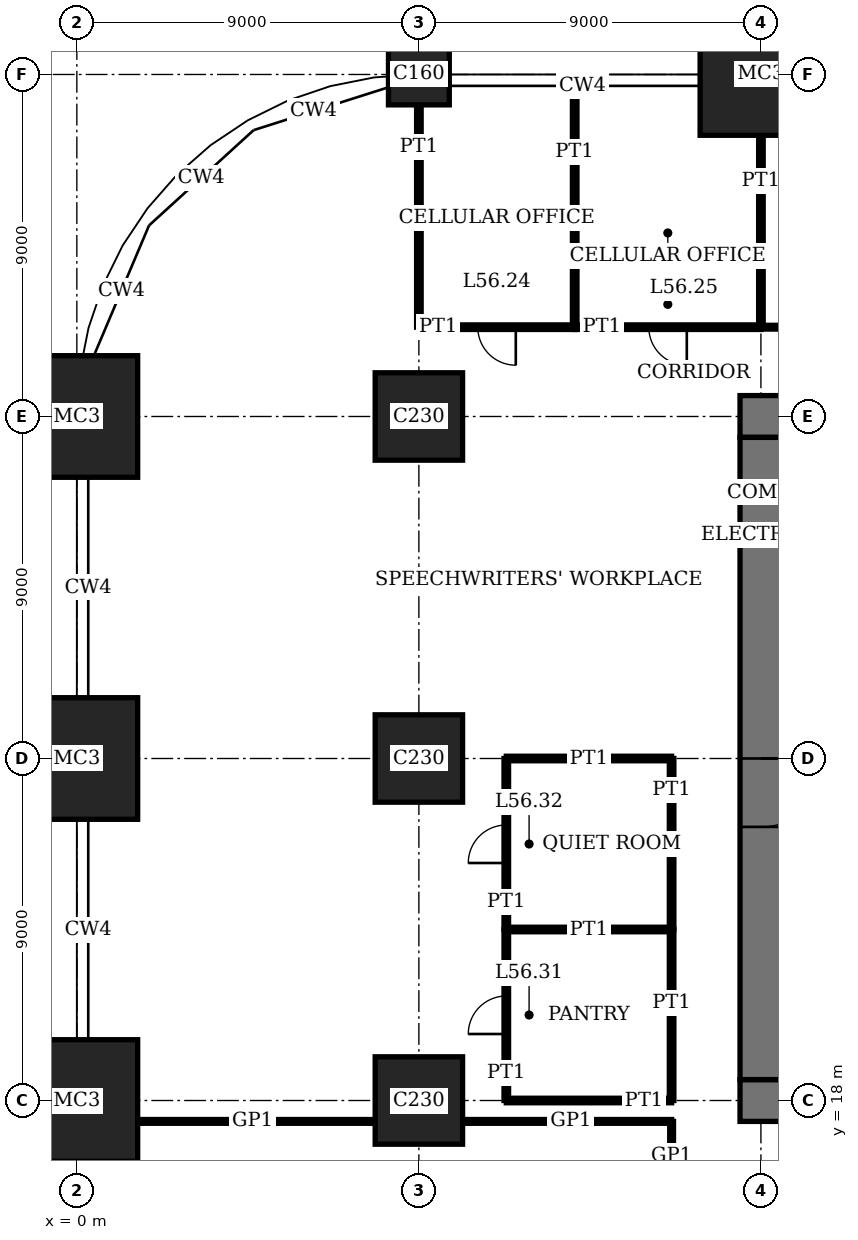
"""IFC4 building model, lengths in metres.
Left out: names, types, materials, properties, quantities, classifications, styles, units other than length and angle.
Written with IfcOpenShell. Run it as: python <this file> out.ifc"""

import sys

from ifc_helpers import new_model, si_unit, direction, frame, frame_2d, origin, origin_2d, place, context, subcontext, project, spatial, rectangle, extrude, element, fill, save


model = new_model("IFC4")
c1 = context("Model", 3, precision=1e-05, world=origin(), true_north=direction((0.0, 1.0)))
c2 = subcontext(c1, "Body", "Model", "MODEL_VIEW")
j1 = project(units=[si_unit("LENGTHUNIT", "METRE"), si_unit("PLANEANGLEUNIT", "RADIAN")], contexts=[c1])
p1 = place(None, origin())
s1 = spatial("IfcSite", under=j1, at=p1, CompositionType="ELEMENT")
p2 = place(p1, origin())
s2 = spatial("IfcBuilding", under=s1, at=p2, CompositionType="ELEMENT")
p3 = place(p2, frame((0.0, 0.0, 230.2)))
s3 = spatial("IfcBuildingStorey", under=s2, at=p3, CompositionType="ELEMENT", Elevation=230.2)
for number, where, z_axis, x_axis in (
    (1, (0.0, 18.0, 0.0), (0.0, 0.0, 1.0), (1.0, 0.0, 0.0)),
    (2, (0.0, 27.0, 0.0), (0.0, 0.0, 1.0), (1.0, 0.0, 0.0)),
    (3, (0.0, 36.0, 0.0), (0.0, 0.0, 1.0), (1.0, 0.0, 0.0)),
):
    element("IfcColumn", number, at=place(p3, frame(where, z_axis=z_axis, x_axis=x_axis)), inside=s3, PredefinedType="COLUMN", context=c2, shape_type="SweptSolid", body=[
        extrude(rectangle(XDim=3.2, YDim=3.2, at=origin_2d()), origin(), (0.0, 0.0, 1.0), 4.2),
    ])
for number, where, z_axis, x_axis in (
    (4, (9.0, 18.0, 0.0), (0.0, 0.0, 1.0), (1.0, 0.0, 0.0)),
    (5, (9.0, 27.0, 0.0), (0.0, 0.0, 1.0), (1.0, 0.0, 0.0)),
    (6, (9.0, 36.0, 0.0), (0.0, 0.0, 1.0), (1.0, 0.0, 0.0)),
):
    element("IfcColumn", number, at=place(p3, frame(where, z_axis=z_axis, x_axis=x_axis)), inside=s3, PredefinedType="COLUMN", context=c2, shape_type="SweptSolid", body=[
        extrude(rectangle(XDim=2.3, YDim=2.3, at=origin_2d()), origin(), (0.0, 0.0, 1.0), 4.2),
    ])
p4 = place(p3, frame((9.0, 45.0, 0.0), z_axis=(0.0, 0.0, 1.0), x_axis=(1.0, 0.0, 0.0)))
e7 = element("IfcColumn", 7, at=p4, inside=s3, PredefinedType="COLUMN", context=c2, shape_type="SweptSolid", body=[
    extrude(rectangle(XDim=1.6, YDim=1.6, at=origin_2d()), origin(), (0.0, 0.0, 1.0), 4.2),
])
p5 = place(p3, frame((18.0, 45.0, 0.0), z_axis=(0.0, 0.0, 1.0), x_axis=(1.0, 0.0, 0.0)))
e8 = element("IfcColumn", 8, at=p5, inside=s3, PredefinedType="COLUMN", context=c2, shape_type="SweptSolid", body=[
    extrude(rectangle(XDim=3.2, YDim=3.2, at=origin_2d()), origin(), (0.0, 0.0, 1.0), 4.2),
])
p6 = place(p3, frame((17.45, 18.0, 0.0), z_axis=(0.0, 0.0, 1.0), x_axis=(1.0, 0.0, 0.0)))
e9 = element("IfcWall", 9, at=p6, inside=s3, PredefinedType="SHEAR", context=c2, shape_type="SweptSolid", body=[
    extrude(rectangle(XDim=28.1, YDim=1.1, at=frame_2d((14.05, 0.0))), origin(), (0.0, 0.0, 1.0), 4.2),
])
p7 = place(p6, frame((11.55, 0.0, 0.0)))
e10 = element("IfcOpeningElement", 10, at=p7, cuts=e9, PredefinedType="OPENING", context=c2, shape_type="SweptSolid", body=[
    extrude(rectangle(XDim=1.0, YDim=2.4, at=frame_2d((0.5, 1.2))), frame((0.0, 0.56, 0.0), z_axis=(0.0, -1.0, 0.0), x_axis=(1.0, 0.0, 0.0)), (0.0, 0.0, 1.0), 1.12),
])
p8 = place(p6, frame((16.55, 0.0, 0.0)))
e11 = element("IfcOpeningElement", 11, at=p8, cuts=e9, PredefinedType="OPENING", context=c2, shape_type="SweptSolid", body=[
    extrude(rectangle(XDim=1.0, YDim=2.4, at=frame_2d((0.5, 1.2))), frame((0.0, 0.56, 0.0), z_axis=(0.0, -1.0, 0.0), x_axis=(1.0, 0.0, 0.0)), (0.0, 0.0, 1.0), 1.12),
])
p9 = place(p6, frame((20.0, 0.0, 0.0)))
e12 = element("IfcOpeningElement", 12, at=p9, cuts=e9, PredefinedType="OPENING", context=c2, shape_type="SweptSolid", body=[
    extrude(rectangle(XDim=1.1, YDim=2.4, at=frame_2d((0.55, 1.2))), frame((0.0, 0.56, 0.0), z_axis=(0.0, -1.0, 0.0), x_axis=(1.0, 0.0, 0.0)), (0.0, 0.0, 1.0), 1.12),
])
p10 = place(p6, frame((24.05, 0.0, 0.0)))
e13 = element("IfcOpeningElement", 13, at=p10, cuts=e9, PredefinedType="OPENING", context=c2, shape_type="SweptSolid", body=[
    extrude(rectangle(XDim=1.0, YDim=2.4, at=frame_2d((0.5, 1.2))), frame((0.0, 0.56, 0.0), z_axis=(0.0, -1.0, 0.0), x_axis=(1.0, 0.0, 0.0)), (0.0, 0.0, 1.0), 1.12),
])
p11 = place(p3, frame((45.55, 36.0, 0.0), z_axis=(0.0, 0.0, 1.0), x_axis=(-1.0, 0.0, 0.0)))
e14 = element("IfcWall", 14, at=p11, inside=s3, PredefinedType="SHEAR", context=c2, shape_type="SweptSolid", body=[
    extrude(rectangle(XDim=28.1, YDim=1.1, at=frame_2d((14.05, 0.0))), origin(), (0.0, 0.0, 1.0), 4.2),
])
p12 = place(p11, frame((11.55, 0.0, 0.0)))
e15 = element("IfcOpeningElement", 15, at=p12, cuts=e14, PredefinedType="OPENING", context=c2, shape_type="SweptSolid", body=[
    extrude(rectangle(XDim=1.0, YDim=2.4, at=frame_2d((0.5, 1.2))), frame((0.0, 0.56, 0.0), z_axis=(0.0, -1.0, 0.0), x_axis=(1.0, 0.0, 0.0)), (0.0, 0.0, 1.0), 1.12),
])
p13 = place(p11, frame((16.55, 0.0, 0.0)))
e16 = element("IfcOpeningElement", 16, at=p13, cuts=e14, PredefinedType="OPENING", context=c2, shape_type="SweptSolid", body=[
    extrude(rectangle(XDim=1.0, YDim=2.4, at=frame_2d((0.5, 1.2))), frame((0.0, 0.56, 0.0), z_axis=(0.0, -1.0, 0.0), x_axis=(1.0, 0.0, 0.0)), (0.0, 0.0, 1.0), 1.12),
])
p14 = place(p11, frame((20.0, 0.0, 0.0)))
e17 = element("IfcOpeningElement", 17, at=p14, cuts=e14, PredefinedType="OPENING", context=c2, shape_type="SweptSolid", body=[
    extrude(rectangle(XDim=1.1, YDim=2.4, at=frame_2d((0.55, 1.2))), frame((0.0, 0.56, 0.0), z_axis=(0.0, -1.0, 0.0), x_axis=(1.0, 0.0, 0.0)), (0.0, 0.0, 1.0), 1.12),
])
p15 = place(p11, frame((24.05, 0.0, 0.0)))
e18 = element("IfcOpeningElement", 18, at=p15, cuts=e14, PredefinedType="OPENING", context=c2, shape_type="SweptSolid", body=[
    extrude(rectangle(XDim=1.0, YDim=2.4, at=frame_2d((0.5, 1.2))), frame((0.0, 0.56, 0.0), z_axis=(0.0, -1.0, 0.0), x_axis=(1.0, 0.0, 0.0)), (0.0, 0.0, 1.0), 1.12),
])
p16 = place(p3, frame((18.0, 35.45, 0.0), z_axis=(0.0, 0.0, 1.0), x_axis=(0.0, -1.0, 0.0)))
e19 = element("IfcWall", 19, at=p16, inside=s3, PredefinedType="SHEAR", context=c2, shape_type="SweptSolid", body=[
    extrude(rectangle(XDim=16.9, YDim=1.1, at=frame_2d((8.45, 0.0))), origin(), (0.0, 0.0, 1.0), 4.2),
])
p17 = place(p16, frame((8.45, 0.0, 0.0)))
e20 = element("IfcOpeningElement", 20, at=p17, cuts=e19, PredefinedType="OPENING", context=c2, shape_type="SweptSolid", body=[
    extrude(rectangle(XDim=1.8, YDim=2.4, at=frame_2d((0.9, 1.2))), frame((0.0, 0.56, 0.0), z_axis=(0.0, -1.0, 0.0), x_axis=(1.0, 0.0, 0.0)), (0.0, 0.0, 1.0), 1.12),
])
p18 = place(p3, frame((1.6, 17.45, 0.0), z_axis=(0.0, 0.0, 1.0), x_axis=(1.0, 0.0, 0.0)))
e21 = element("IfcWall", 21, at=p18, inside=s3, PredefinedType="PARTITIONING", context=c2, shape_type="SweptSolid", body=[
    extrude(rectangle(XDim=6.25, YDim=0.1, at=frame_2d((3.125, 0.0))), origin(), (0.0, 0.0, 1.0), 3.85),
])
p19 = place(p3, frame((10.15, 17.45, 0.0), z_axis=(0.0, 0.0, 1.0), x_axis=(1.0, 0.0, 0.0)))
e22 = element("IfcWall", 22, at=p19, inside=s3, PredefinedType="PARTITIONING", context=c2, shape_type="SweptSolid", body=[
    extrude(rectangle(XDim=5.5, YDim=0.1, at=frame_2d((2.75, 0.0))), origin(), (0.0, 0.0, 1.0), 3.85),
])
p20 = place(p3, frame((11.3, 18.0, 0.0), z_axis=(0.0, 0.0, 1.0), x_axis=(1.0, 0.0, 0.0)))
e23 = element("IfcWall", 23, at=p20, inside=s3, PredefinedType="PARTITIONING", context=c2, shape_type="SweptSolid", body=[
    extrude(rectangle(XDim=4.35, YDim=0.12, at=frame_2d((2.175, 0.0))), origin(), (0.0, 0.0, 1.0), 3.25),
])
p21 = place(p3, frame((11.3, 22.5, 0.0), z_axis=(0.0, 0.0, 1.0), x_axis=(1.0, 0.0, 0.0)))
e24 = element("IfcWall", 24, at=p21, inside=s3, PredefinedType="PARTITIONING", context=c2, shape_type="SweptSolid", body=[
    extrude(rectangle(XDim=4.35, YDim=0.12, at=frame_2d((2.175, 0.0))), origin(), (0.0, 0.0, 1.0), 3.15),
])
p22 = place(p3, frame((11.3, 27.0, 0.0), z_axis=(0.0, 0.0, 1.0), x_axis=(1.0, 0.0, 0.0)))
e25 = element("IfcWall", 25, at=p22, inside=s3, PredefinedType="PARTITIONING", context=c2, shape_type="SweptSolid", body=[
    extrude(rectangle(XDim=4.35, YDim=0.12, at=frame_2d((2.175, 0.0))), origin(), (0.0, 0.0, 1.0), 3.25),
])
p23 = place(p3, frame((9.0, 38.35, 0.0), z_axis=(0.0, 0.0, 1.0), x_axis=(1.0, 0.0, 0.0)))
e26 = element("IfcWall", 26, at=p23, inside=s3, PredefinedType="PARTITIONING", context=c2, shape_type="SweptSolid", body=[
    extrude(rectangle(XDim=4.1, YDim=0.12, at=frame_2d((2.05, 0.0))), origin(), (0.0, 0.0, 1.0), 3.85),
])
p24 = place(p23, frame((1.55, 0.0, 0.0)))
e27 = element("IfcOpeningElement", 27, at=p24, cuts=e26, PredefinedType="OPENING", context=c2, shape_type="SweptSolid", body=[
    extrude(rectangle(XDim=1.0, YDim=2.4, at=frame_2d((0.5, 1.2))), frame((0.0, 0.07, 0.0), z_axis=(0.0, -1.0, 0.0), x_axis=(1.0, 0.0, 0.0)), (0.0, 0.0, 1.0), 0.14),
])
p25 = place(p3, frame((13.1, 38.35, 0.0), z_axis=(0.0, 0.0, 1.0), x_axis=(1.0, 0.0, 0.0)))
e28 = element("IfcWall", 28, at=p25, inside=s3, PredefinedType="PARTITIONING", context=c2, shape_type="SweptSolid", body=[
    extrude(rectangle(XDim=4.9, YDim=0.12, at=frame_2d((2.45, 0.0))), origin(), (0.0, 0.0, 1.0), 3.85),
])
p26 = place(p25, frame((1.95, 0.0, 0.0)))
e29 = element("IfcOpeningElement", 29, at=p26, cuts=e28, PredefinedType="OPENING", context=c2, shape_type="SweptSolid", body=[
    extrude(rectangle(XDim=1.0, YDim=2.4, at=frame_2d((0.5, 1.2))), frame((0.0, 0.07, 0.0), z_axis=(0.0, -1.0, 0.0), x_axis=(1.0, 0.0, 0.0)), (0.0, 0.0, 1.0), 0.14),
])
p27 = place(p3, frame((18.0, 38.35, 0.0), z_axis=(0.0, 0.0, 1.0), x_axis=(1.0, 0.0, 0.0)))
e30 = element("IfcWall", 30, at=p27, inside=s3, PredefinedType="PARTITIONING", context=c2, shape_type="SweptSolid", body=[
    extrude(rectangle(XDim=9.0, YDim=0.1, at=frame_2d((4.5, 0.0))), origin(), (0.0, 0.0, 1.0), 3.85),
])
p28 = place(p27, frame((4.0, 0.0, 0.0)))
e31 = element("IfcOpeningElement", 31, at=p28, cuts=e30, PredefinedType="OPENING", context=c2, shape_type="SweptSolid", body=[
    extrude(rectangle(XDim=1.0, YDim=2.4, at=frame_2d((0.5, 1.2))), frame((0.0, 0.06, 0.0), z_axis=(0.0, -1.0, 0.0), x_axis=(1.0, 0.0, 0.0)), (0.0, 0.0, 1.0), 0.12),
])
p29 = place(p3, frame((9.0, 38.35, 0.0), z_axis=(0.0, 0.0, 1.0), x_axis=(0.0, 1.0, 0.0)))
e32 = element("IfcWall", 32, at=p29, inside=s3, PredefinedType="PARTITIONING", context=c2, shape_type="SweptSolid", body=[
    extrude(rectangle(XDim=5.85, YDim=0.12, at=frame_2d((2.925, 0.0))), origin(), (0.0, 0.0, 1.0), 3.05),
])
p30 = place(p3, frame((11.3, 18.0, 0.0), z_axis=(0.0, 0.0, 1.0), x_axis=(0.0, 1.0, 0.0)))
e33 = element("IfcWall", 33, at=p30, inside=s3, PredefinedType="PARTITIONING", context=c2, shape_type="SweptSolid", body=[
    extrude(rectangle(XDim=4.5, YDim=0.12, at=frame_2d((2.25, 0.0))), origin(), (0.0, 0.0, 1.0), 3.85),
])
p31 = place(p30, frame((1.75, 0.0, 0.0)))
e34 = element("IfcOpeningElement", 34, at=p31, cuts=e33, PredefinedType="OPENING", context=c2, shape_type="SweptSolid", body=[
    extrude(rectangle(XDim=1.0, YDim=2.4, at=frame_2d((0.5, 1.2))), frame((0.0, 0.07, 0.0), z_axis=(0.0, -1.0, 0.0), x_axis=(1.0, 0.0, 0.0)), (0.0, 0.0, 1.0), 0.14),
])
p32 = place(p3, frame((11.3, 22.5, 0.0), z_axis=(0.0, 0.0, 1.0), x_axis=(0.0, 1.0, 0.0)))
e35 = element("IfcWall", 35, at=p32, inside=s3, PredefinedType="PARTITIONING", context=c2, shape_type="SweptSolid", body=[
    extrude(rectangle(XDim=4.5, YDim=0.12, at=frame_2d((2.25, 0.0))), origin(), (0.0, 0.0, 1.0), 3.85),
])
p33 = place(p32, frame((1.75, 0.0, 0.0)))
e36 = element("IfcOpeningElement", 36, at=p33, cuts=e35, PredefinedType="OPENING", context=c2, shape_type="SweptSolid", body=[
    extrude(rectangle(XDim=1.0, YDim=2.4, at=frame_2d((0.5, 1.2))), frame((0.0, 0.07, 0.0), z_axis=(0.0, -1.0, 0.0), x_axis=(1.0, 0.0, 0.0)), (0.0, 0.0, 1.0), 0.14),
])
p34 = place(p3, frame((13.1, 38.35, 0.0), z_axis=(0.0, 0.0, 1.0), x_axis=(0.0, 1.0, 0.0)))
e37 = element("IfcWall", 37, at=p34, inside=s3, PredefinedType="PARTITIONING", context=c2, shape_type="SweptSolid", body=[
    extrude(rectangle(XDim=6.34, YDim=0.12, at=frame_2d((3.17, 0.0))), origin(), (0.0, 0.0, 1.0), 3.85),
])
for number, where, z_axis, x_axis in (
    (38, (15.65, 18.0, 0.0), (0.0, 0.0, 1.0), (0.0, 1.0, 0.0)),
    (39, (15.65, 22.5, 0.0), (0.0, 0.0, 1.0), (0.0, 1.0, 0.0)),
):
    element("IfcWall", number, at=place(p3, frame(where, z_axis=z_axis, x_axis=x_axis)), inside=s3, PredefinedType="PARTITIONING", context=c2, shape_type="SweptSolid", body=[
        extrude(rectangle(XDim=4.5, YDim=0.12, at=frame_2d((2.25, 0.0))), origin(), (0.0, 0.0, 1.0), 3.85),
    ])
p35 = place(p3, frame((15.65, 15.65, 0.0), z_axis=(0.0, 0.0, 1.0), x_axis=(0.0, 1.0, 0.0)))
e40 = element("IfcWall", 40, at=p35, inside=s3, PredefinedType="PARTITIONING", context=c2, shape_type="SweptSolid", body=[
    extrude(rectangle(XDim=1.8, YDim=0.1, at=frame_2d((0.9, 0.0))), origin(), (0.0, 0.0, 1.0), 3.85),
])
p36 = place(p3, frame((18.0, 38.35, 0.0), z_axis=(0.0, 0.0, 1.0), x_axis=(0.0, 1.0, 0.0)))
e41 = element("IfcWall", 41, at=p36, inside=s3, PredefinedType="PARTITIONING", context=c2, shape_type="SweptSolid", body=[
    extrude(rectangle(XDim=5.05, YDim=0.12, at=frame_2d((2.525, 0.0))), origin(), (0.0, 0.0, 1.0), 3.25),
])
p37 = place(p17, origin())
e42 = element("IfcDoor", 42, at=p37, inside=s3, OperationType="DOUBLE_DOOR_DOUBLE_SWING", PredefinedType="DOOR", context=c2, shape_type="SweptSolid", body=[
    extrude(rectangle(XDim=1.8, YDim=2.4, at=frame_2d((0.9, 1.2))), frame((0.0, 0.03, 0.0), z_axis=(0.0, -1.0, 0.0), x_axis=(1.0, 0.0, 0.0)), (0.0, 0.0, 1.0), 0.06),
    extrude(rectangle(XDim=0.04, YDim=2.4, at=frame_2d((0.02, 1.2))), frame((0.0, 0.55, 0.0), z_axis=(0.0, -1.0, 0.0), x_axis=(1.0, 0.0, 0.0)), (0.0, 0.0, 1.0), 1.1),
    extrude(rectangle(XDim=0.04, YDim=2.4, at=frame_2d((1.78, 1.2))), frame((0.0, 0.55, 0.0), z_axis=(0.0, -1.0, 0.0), x_axis=(1.0, 0.0, 0.0)), (0.0, 0.0, 1.0), 1.1),
    extrude(rectangle(XDim=1.8, YDim=0.04, at=frame_2d((0.9, 2.38))), frame((0.0, 0.55, 0.0), z_axis=(0.0, -1.0, 0.0), x_axis=(1.0, 0.0, 0.0)), (0.0, 0.0, 1.0), 1.1),
])
fill(e20, e42)
p38 = place(p24, origin())
e43 = element("IfcDoor", 43, at=p38, inside=s3, OperationType="SINGLE_SWING_RIGHT", PredefinedType="DOOR", context=c2, shape_type="SweptSolid", body=[
    extrude(rectangle(XDim=1.0, YDim=2.4, at=frame_2d((0.5, 1.2))), frame((0.0, 0.025, 0.0), z_axis=(0.0, -1.0, 0.0), x_axis=(1.0, 0.0, 0.0)), (0.0, 0.0, 1.0), 0.05),
])
fill(e27, e43)
p39 = place(p26, origin())
e44 = element("IfcDoor", 44, at=p39, inside=s3, OperationType="SINGLE_SWING_RIGHT", PredefinedType="DOOR", context=c2, shape_type="SweptSolid", body=[
    extrude(rectangle(XDim=1.0, YDim=2.4, at=frame_2d((0.5, 1.2))), frame((0.0, 0.025, 0.0), z_axis=(0.0, -1.0, 0.0), x_axis=(1.0, 0.0, 0.0)), (0.0, 0.0, 1.0), 0.05),
])
fill(e29, e44)
p40 = place(p31, origin())
e45 = element("IfcDoor", 45, at=p40, inside=s3, OperationType="SINGLE_SWING_RIGHT", PredefinedType="DOOR", context=c2, shape_type="SweptSolid", body=[
    extrude(rectangle(XDim=1.0, YDim=2.4, at=frame_2d((0.5, 1.2))), frame((0.0, 0.025, 0.0), z_axis=(0.0, -1.0, 0.0), x_axis=(1.0, 0.0, 0.0)), (0.0, 0.0, 1.0), 0.05),
])
fill(e34, e45)
p41 = place(p33, origin())
e46 = element("IfcDoor", 46, at=p41, inside=s3, OperationType="SINGLE_SWING_RIGHT", PredefinedType="DOOR", context=c2, shape_type="SweptSolid", body=[
    extrude(rectangle(XDim=1.0, YDim=2.4, at=frame_2d((0.5, 1.2))), frame((0.0, 0.025, 0.0), z_axis=(0.0, -1.0, 0.0), x_axis=(1.0, 0.0, 0.0)), (0.0, 0.0, 1.0), 0.05),
])
fill(e36, e46)
save(model, sys.argv[1])
